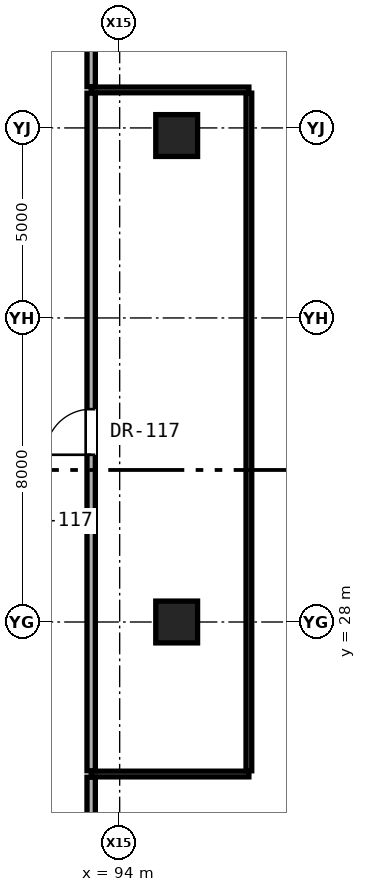
"""IFC4 building model, lengths in metres.
Left out: names, types, materials, properties, quantities, classifications, styles, units other than length and angle.
Written with IfcOpenShell. Run it as: python <this file> out.ifc"""

import sys

from ifc_helpers import new_model, si_unit, direction, frame, frame_2d, origin, origin_2d, place, context, subcontext, project, spatial, rectangle, extrude, element, fill, save


model = new_model("IFC4")
c1 = context("Model", 3, precision=1e-05, world=origin(), true_north=direction((0.0, 1.0)))
c2 = subcontext(c1, "Body", "Model", "MODEL_VIEW")
j1 = project(units=[si_unit("LENGTHUNIT", "METRE"), si_unit("PLANEANGLEUNIT", "RADIAN")], contexts=[c1])
p1 = place(None, origin())
s1 = spatial("IfcSite", under=j1, at=p1, CompositionType="ELEMENT")
p2 = place(p1, origin())
s2 = spatial("IfcBuilding", under=s1, at=p2, CompositionType="ELEMENT")
p3 = place(p2, origin())
s3 = spatial("IfcBuildingStorey", under=s2, at=p3, CompositionType="ELEMENT", Elevation=0.0)
for number, where, z_axis, x_axis in (
    (1, (95.5, 28.0, 0.0), (0.0, 0.0, 1.0), (1.0, 0.0, 0.0)),
    (2, (95.5, 40.8, 0.0), (0.0, 0.0, 1.0), (1.0, 0.0, 0.0)),
):
    element("IfcColumn", number, at=place(p3, frame(where, z_axis=z_axis, x_axis=x_axis)), inside=s3, PredefinedType="COLUMN", context=c2, shape_type="SweptSolid", body=[
        extrude(rectangle(XDim=1.1, YDim=1.1, at=origin_2d()), origin(), (0.0, 0.0, 1.0), 5.2),
    ])
p4 = place(p3, frame((93.25, 24.0, 0.0), z_axis=(0.0, 0.0, 1.0), x_axis=(1.0, 0.0, 0.0)))
e3 = element("IfcWall", 3, at=p4, inside=s3, PredefinedType="PARTITIONING", context=c2, shape_type="SweptSolid", body=[
    extrude(rectangle(XDim=4.15, YDim=0.15, at=frame_2d((2.075, 0.0))), origin(), (0.0, 0.0, 1.0), 4.016),
])
p5 = place(p3, frame((93.25, 42.0, 0.0), z_axis=(0.0, 0.0, 1.0), x_axis=(1.0, 0.0, 0.0)))
e4 = element("IfcWall", 4, at=p5, inside=s3, PredefinedType="PARTITIONING", context=c2, shape_type="SweptSolid", body=[
    extrude(rectangle(XDim=4.15, YDim=0.15, at=frame_2d((2.075, 0.0))), origin(), (0.0, 0.0, 1.0), 4.88),
])
p6 = place(p3, frame((93.25, 18.585, 0.0), z_axis=(0.0, 0.0, 1.0), x_axis=(0.0, 1.0, 0.0)))
e5 = element("IfcWall", 5, at=p6, inside=s3, PredefinedType="SOLIDWALL", context=c2, shape_type="SweptSolid", body=[
    extrude(rectangle(XDim=5.33, YDim=0.22, at=frame_2d((2.665, 0.0))), origin(), (0.0, 0.0, 1.0), 4.88),
])
p7 = place(p3, frame((93.25, 24.085, 0.0), z_axis=(0.0, 0.0, 1.0), x_axis=(0.0, 1.0, 0.0)))
e6 = element("IfcWall", 6, at=p7, inside=s3, PredefinedType="SOLIDWALL", context=c2, shape_type="SweptSolid", body=[
    extrude(rectangle(XDim=17.83, YDim=0.22, at=frame_2d((8.915, 0.0))), origin(), (0.0, 0.0, 1.0), 4.016),
])
p8 = place(p7, frame((8.315, 0.0, 0.0)))
e7 = element("IfcOpeningElement", 7, at=p8, cuts=e6, PredefinedType="OPENING", context=c2, shape_type="SweptSolid", body=[
    extrude(rectangle(XDim=1.2, YDim=2.25, at=frame_2d((0.6, 1.125))), frame((0.0, 0.12, 0.0), z_axis=(0.0, -1.0, 0.0), x_axis=(1.0, 0.0, 0.0)), (0.0, 0.0, 1.0), 0.24),
])
p9 = place(p3, frame((93.25, 42.085, 0.0), z_axis=(0.0, 0.0, 1.0), x_axis=(0.0, 1.0, 0.0)))
e8 = element("IfcWall", 8, at=p9, inside=s3, PredefinedType="SOLIDWALL", context=c2, shape_type="SweptSolid", body=[
    extrude(rectangle(XDim=11.765, YDim=0.22, at=frame_2d((5.883, 0.0))), origin(), (0.0, 0.0, 1.0), 4.88),
])
p10 = place(p3, frame((97.4, 24.085, 0.0), z_axis=(0.0, 0.0, 1.0), x_axis=(0.0, 1.0, 0.0)))
e9 = element("IfcWall", 9, at=p10, inside=s3, PredefinedType="PARTITIONING", context=c2, shape_type="SweptSolid", body=[
    extrude(rectangle(XDim=17.83, YDim=0.15, at=frame_2d((8.915, 0.0))), origin(), (0.0, 0.0, 1.0), 4.88),
])
p11 = place(p8, origin())
e10 = element("IfcDoor", 10, at=p11, inside=s3, OperationType="SINGLE_SWING_LEFT", PredefinedType="DOOR", context=c2, shape_type="SweptSolid", body=[
    extrude(rectangle(XDim=1.2, YDim=2.25, at=frame_2d((0.6, 1.125))), frame((0.0, 0.025, 0.0), z_axis=(0.0, -1.0, 0.0), x_axis=(1.0, 0.0, 0.0)), (0.0, 0.0, 1.0), 0.05),
])
fill(e7, e10)
save(model, sys.argv[1])
